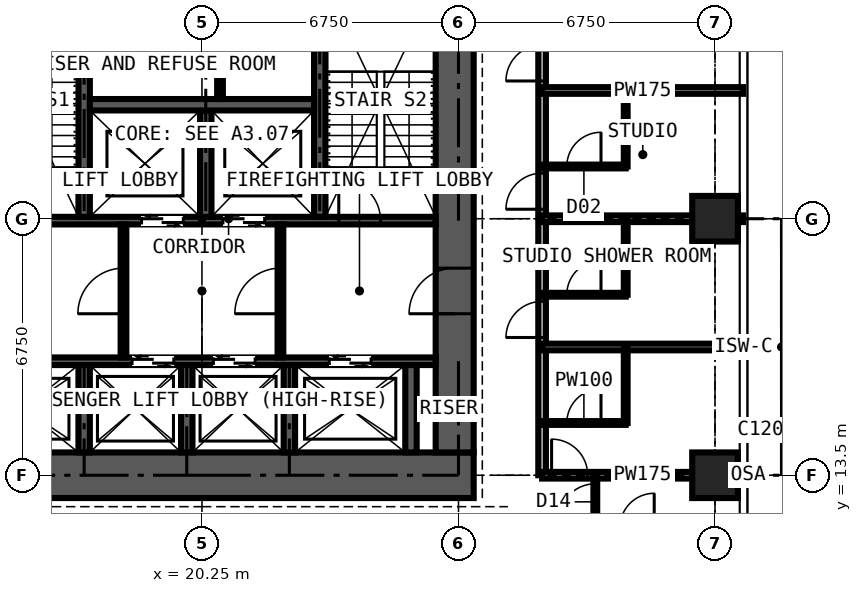
"""IFC4 building model, lengths in metres.
Left out: names, types, materials, properties, quantities, classifications, styles, units other than length and angle.
Written with IfcOpenShell. Run it as: python <this file> out.ifc"""

import sys

from ifc_helpers import new_model, si_unit, direction, frame, frame_2d, origin, origin_2d, place, context, subcontext, project, spatial, rectangle, extrude, element, fill, save


model = new_model("IFC4")
c1 = context("Model", 3, precision=1e-05, world=origin(), true_north=direction((0.0, 1.0)))
c2 = subcontext(c1, "Body", "Model", "MODEL_VIEW")
j1 = project(units=[si_unit("LENGTHUNIT", "METRE"), si_unit("PLANEANGLEUNIT", "RADIAN")], contexts=[c1])
p1 = place(None, origin())
s1 = spatial("IfcSite", under=j1, at=p1, CompositionType="ELEMENT")
p2 = place(p1, origin())
s2 = spatial("IfcBuilding", under=s1, at=p2, CompositionType="ELEMENT")
p3 = place(p2, frame((0.0, 0.0, 189.0)))
s3 = spatial("IfcBuildingStorey", under=s2, at=p3, CompositionType="ELEMENT", Elevation=189.0)
for number, where, z_axis, x_axis in (
    (1, (33.75, 13.5, 0.0), (0.0, 0.0, 1.0), (1.0, 0.0, 0.0)),
    (2, (33.75, 20.25, 0.0), (0.0, 0.0, 1.0), (1.0, 0.0, 0.0)),
):
    element("IfcColumn", number, at=place(p3, frame(where, z_axis=z_axis, x_axis=x_axis)), inside=s3, PredefinedType="COLUMN", context=c2, shape_type="SweptSolid", body=[
        extrude(rectangle(XDim=1.2, YDim=1.2, at=origin_2d()), origin(), (0.0, 0.0, 1.0), 3.6),
    ])
p4 = place(p3, frame((13.1, 13.5, 0.0), z_axis=(0.0, 0.0, 1.0), x_axis=(1.0, 0.0, 0.0)))
e3 = element("IfcWall", 3, at=p4, inside=s3, PredefinedType="SHEAR", context=c2, shape_type="SweptSolid", body=[
    extrude(rectangle(XDim=14.3, YDim=1.2, at=frame_2d((7.15, 0.0))), origin(), (0.0, 0.0, 1.0), 3.6),
])
p5 = place(p3, frame((26.9, 14.1, 0.0), z_axis=(0.0, 0.0, 1.0), x_axis=(0.0, 1.0, 0.0)))
e4 = element("IfcWall", 4, at=p5, inside=s3, PredefinedType="SHEAR", context=c2, shape_type="SweptSolid", body=[
    extrude(rectangle(XDim=12.3, YDim=1.0, at=frame_2d((6.15, 0.0))), origin(), (0.0, 0.0, 1.0), 3.6),
])
p6 = place(p5, frame((3.65, 0.0, 0.0)))
e5 = element("IfcOpeningElement", 5, at=p6, cuts=e4, PredefinedType="OPENING", context=c2, shape_type="SweptSolid", body=[
    extrude(rectangle(XDim=1.2, YDim=2.2, at=frame_2d((0.6, 1.1))), frame((0.0, 0.51, 0.0), z_axis=(0.0, -1.0, 0.0), x_axis=(1.0, 0.0, 0.0)), (0.0, 0.0, 1.0), 1.02),
])
p7 = place(p3, frame((14.1, 16.5, 0.0), z_axis=(0.0, 0.0, 1.0), x_axis=(1.0, 0.0, 0.0)))
e6 = element("IfcWall", 6, at=p7, inside=s3, PredefinedType="SHEAR", context=c2, shape_type="SweptSolid", body=[
    extrude(rectangle(XDim=12.3, YDim=0.2, at=frame_2d((6.15, 0.0))), origin(), (0.0, 0.0, 1.0), 3.6),
])
p8 = place(p7, frame((0.9, 0.0, 0.0)))
e7 = element("IfcOpeningElement", 7, at=p8, cuts=e6, PredefinedType="OPENING", context=c2, shape_type="SweptSolid", body=[
    extrude(rectangle(XDim=1.1, YDim=2.2, at=frame_2d((0.55, 1.1))), frame((0.0, 0.11, 0.0), z_axis=(0.0, -1.0, 0.0), x_axis=(1.0, 0.0, 0.0)), (0.0, 0.0, 1.0), 0.22),
])
p9 = place(p7, frame((4.31, 0.0, 0.0)))
e8 = element("IfcOpeningElement", 8, at=p9, cuts=e6, PredefinedType="OPENING", context=c2, shape_type="SweptSolid", body=[
    extrude(rectangle(XDim=1.1, YDim=2.2, at=frame_2d((0.55, 1.1))), frame((0.0, 0.11, 0.0), z_axis=(0.0, -1.0, 0.0), x_axis=(1.0, 0.0, 0.0)), (0.0, 0.0, 1.0), 0.22),
])
p10 = place(p7, frame((6.45, 0.0, 0.0)))
e9 = element("IfcOpeningElement", 9, at=p10, cuts=e6, PredefinedType="OPENING", context=c2, shape_type="SweptSolid", body=[
    extrude(rectangle(XDim=1.1, YDim=2.2, at=frame_2d((0.55, 1.1))), frame((0.0, 0.11, 0.0), z_axis=(0.0, -1.0, 0.0), x_axis=(1.0, 0.0, 0.0)), (0.0, 0.0, 1.0), 0.22),
])
p11 = place(p7, frame((9.5, 0.0, 0.0)))
e10 = element("IfcOpeningElement", 10, at=p11, cuts=e6, PredefinedType="OPENING", context=c2, shape_type="SweptSolid", body=[
    extrude(rectangle(XDim=1.1, YDim=2.2, at=frame_2d((0.55, 1.1))), frame((0.0, 0.11, 0.0), z_axis=(0.0, -1.0, 0.0), x_axis=(1.0, 0.0, 0.0)), (0.0, 0.0, 1.0), 0.22),
])
p12 = place(p3, frame((14.1, 20.2, 0.0), z_axis=(0.0, 0.0, 1.0), x_axis=(1.0, 0.0, 0.0)))
e11 = element("IfcWall", 11, at=p12, inside=s3, PredefinedType="SHEAR", context=c2, shape_type="SweptSolid", body=[
    extrude(rectangle(XDim=12.3, YDim=0.2, at=frame_2d((6.15, 0.0))), origin(), (0.0, 0.0, 1.0), 3.6),
])
p13 = place(p12, frame((4.56, 0.0, 0.0)))
e12 = element("IfcOpeningElement", 12, at=p13, cuts=e11, PredefinedType="OPENING", context=c2, shape_type="SweptSolid", body=[
    extrude(rectangle(XDim=1.1, YDim=2.2, at=frame_2d((0.55, 1.1))), frame((0.0, 0.11, 0.0), z_axis=(0.0, -1.0, 0.0), x_axis=(1.0, 0.0, 0.0)), (0.0, 0.0, 1.0), 0.22),
])
p14 = place(p12, frame((6.7, 0.0, 0.0)))
e13 = element("IfcOpeningElement", 13, at=p14, cuts=e11, PredefinedType="OPENING", context=c2, shape_type="SweptSolid", body=[
    extrude(rectangle(XDim=1.1, YDim=2.2, at=frame_2d((0.55, 1.1))), frame((0.0, 0.11, 0.0), z_axis=(0.0, -1.0, 0.0), x_axis=(1.0, 0.0, 0.0)), (0.0, 0.0, 1.0), 0.22),
])
p15 = place(p12, frame((0.35, 0.0, 0.0)))
e14 = element("IfcOpeningElement", 14, at=p15, cuts=e11, PredefinedType="OPENING", context=c2, shape_type="SweptSolid", body=[
    extrude(rectangle(XDim=1.1, YDim=2.2, at=frame_2d((0.55, 1.1))), frame((0.0, 0.11, 0.0), z_axis=(0.0, -1.0, 0.0), x_axis=(1.0, 0.0, 0.0)), (0.0, 0.0, 1.0), 0.22),
])
p16 = place(p12, frame((9.75, 0.0, 0.0)))
e15 = element("IfcOpeningElement", 15, at=p16, cuts=e11, PredefinedType="OPENING", context=c2, shape_type="SweptSolid", body=[
    extrude(rectangle(XDim=1.1, YDim=2.2, at=frame_2d((0.55, 1.1))), frame((0.0, 0.11, 0.0), z_axis=(0.0, -1.0, 0.0), x_axis=(1.0, 0.0, 0.0)), (0.0, 0.0, 1.0), 0.22),
])
for number, where, z_axis, x_axis in (
    (16, (17.15, 20.3, 0.0), (0.0, 0.0, 1.0), (0.0, 1.0, 0.0)),
    (17, (23.35, 20.3, 0.0), (0.0, 0.0, 1.0), (0.0, 1.0, 0.0)),
):
    element("IfcWall", number, at=place(p3, frame(where, z_axis=z_axis, x_axis=x_axis)), inside=s3, PredefinedType="SHEAR", context=c2, shape_type="SweptSolid", body=[
        extrude(rectangle(XDim=6.1, YDim=0.3, at=frame_2d((3.05, 0.0))), origin(), (0.0, 0.0, 1.0), 3.6),
    ])
p17 = place(p3, frame((20.35, 20.3, 0.0), z_axis=(0.0, 0.0, 1.0), x_axis=(0.0, 1.0, 0.0)))
e18 = element("IfcWall", 18, at=p17, inside=s3, PredefinedType="SHEAR", context=c2, shape_type="SweptSolid", body=[
    extrude(rectangle(XDim=2.8, YDim=0.3, at=frame_2d((1.4, 0.0))), origin(), (0.0, 0.0, 1.0), 3.6),
])
p18 = place(p3, frame((17.3, 23.25, 0.0), z_axis=(0.0, 0.0, 1.0), x_axis=(1.0, 0.0, 0.0)))
e19 = element("IfcWall", 19, at=p18, inside=s3, PredefinedType="SHEAR", context=c2, shape_type="SweptSolid", body=[
    extrude(rectangle(XDim=5.9, YDim=0.3, at=frame_2d((2.95, 0.0))), origin(), (0.0, 0.0, 1.0), 3.6),
])
for number, where, z_axis, x_axis in (
    (20, (17.15, 14.1, 0.0), (0.0, 0.0, 1.0), (0.0, 1.0, 0.0)),
    (21, (19.85, 14.1, 0.0), (0.0, 0.0, 1.0), (0.0, 1.0, 0.0)),
    (22, (22.55, 14.1, 0.0), (0.0, 0.0, 1.0), (0.0, 1.0, 0.0)),
    (23, (25.75, 14.1, 0.0), (0.0, 0.0, 1.0), (0.0, 1.0, 0.0)),
):
    element("IfcWall", number, at=place(p3, frame(where, z_axis=z_axis, x_axis=x_axis)), inside=s3, PredefinedType="SHEAR", context=c2, shape_type="SweptSolid", body=[
        extrude(rectangle(XDim=2.3, YDim=0.3, at=frame_2d((1.15, 0.0))), origin(), (0.0, 0.0, 1.0), 3.6),
    ])
p19 = place(p3, frame((18.185, 16.6, 0.0), z_axis=(0.0, 0.0, 1.0), x_axis=(0.0, 1.0, 0.0)))
e24 = element("IfcWall", 24, at=p19, inside=s3, PredefinedType="PARTITIONING", context=c2, shape_type="SweptSolid", body=[
    extrude(rectangle(XDim=3.5, YDim=0.15, at=frame_2d((1.75, 0.0))), origin(), (0.0, 0.0, 1.0), 3.375),
])
p20 = place(p19, frame((1.15, 0.0, 0.0)))
e25 = element("IfcOpeningElement", 25, at=p20, cuts=e24, PredefinedType="OPENING", context=c2, shape_type="SweptSolid", body=[
    extrude(rectangle(XDim=1.2, YDim=2.2, at=frame_2d((0.6, 1.1))), frame((0.0, 0.085, 0.0), z_axis=(0.0, -1.0, 0.0), x_axis=(1.0, 0.0, 0.0)), (0.0, 0.0, 1.0), 0.17),
])
p21 = place(p3, frame((22.315, 16.6, 0.0), z_axis=(0.0, 0.0, 1.0), x_axis=(0.0, 1.0, 0.0)))
e26 = element("IfcWall", 26, at=p21, inside=s3, PredefinedType="PARTITIONING", context=c2, shape_type="SweptSolid", body=[
    extrude(rectangle(XDim=3.5, YDim=0.15, at=frame_2d((1.75, 0.0))), origin(), (0.0, 0.0, 1.0), 3.375),
])
p22 = place(p21, frame((1.15, 0.0, 0.0)))
e27 = element("IfcOpeningElement", 27, at=p22, cuts=e26, PredefinedType="OPENING", context=c2, shape_type="SweptSolid", body=[
    extrude(rectangle(XDim=1.2, YDim=2.2, at=frame_2d((0.6, 1.1))), frame((0.0, 0.085, 0.0), z_axis=(0.0, -1.0, 0.0), x_axis=(1.0, 0.0, 0.0)), (0.0, 0.0, 1.0), 0.17),
])
p23 = place(p3, frame((20.725, 23.4, 0.0), z_axis=(0.0, 0.0, 1.0), x_axis=(0.0, 1.0, 0.0)))
e28 = element("IfcWall", 28, at=p23, inside=s3, PredefinedType="PARTITIONING", context=c2, shape_type="SweptSolid", body=[
    extrude(rectangle(XDim=3.0, YDim=0.15, at=frame_2d((1.5, 0.0))), origin(), (0.0, 0.0, 1.0), 3.375),
])
p24 = place(p3, frame((29.2, 13.5, 0.0), z_axis=(0.0, 0.0, 1.0), x_axis=(0.0, 1.0, 0.0)))
e29 = element("IfcWall", 29, at=p24, inside=s3, PredefinedType="PARTITIONING", context=c2, shape_type="SweptSolid", body=[
    extrude(rectangle(XDim=15.7, YDim=0.2, at=frame_2d((7.85, 0.0))), origin(), (0.0, 0.0, 1.0), 3.375),
])
p25 = place(p24, frame((3.625, 0.0, 0.0)))
e30 = element("IfcOpeningElement", 30, at=p25, cuts=e29, PredefinedType="OPENING", context=c2, shape_type="SweptSolid", body=[
    extrude(rectangle(XDim=0.95, YDim=2.2, at=frame_2d((0.475, 1.1))), frame((0.0, 0.11, 0.0), z_axis=(0.0, -1.0, 0.0), x_axis=(1.0, 0.0, 0.0)), (0.0, 0.0, 1.0), 0.22),
])
p26 = place(p24, frame((7.0, 0.0, 0.0)))
e31 = element("IfcOpeningElement", 31, at=p26, cuts=e29, PredefinedType="OPENING", context=c2, shape_type="SweptSolid", body=[
    extrude(rectangle(XDim=0.95, YDim=2.2, at=frame_2d((0.475, 1.1))), frame((0.0, 0.11, 0.0), z_axis=(0.0, -1.0, 0.0), x_axis=(1.0, 0.0, 0.0)), (0.0, 0.0, 1.0), 0.22),
])
p27 = place(p24, frame((10.375, 0.0, 0.0)))
e32 = element("IfcOpeningElement", 32, at=p27, cuts=e29, PredefinedType="OPENING", context=c2, shape_type="SweptSolid", body=[
    extrude(rectangle(XDim=0.95, YDim=2.2, at=frame_2d((0.475, 1.1))), frame((0.0, 0.11, 0.0), z_axis=(0.0, -1.0, 0.0), x_axis=(1.0, 0.0, 0.0)), (0.0, 0.0, 1.0), 0.22),
])
p28 = place(p24, frame((14.1, 0.0, 0.0)))
e33 = element("IfcOpeningElement", 33, at=p28, cuts=e29, PredefinedType="OPENING", context=c2, shape_type="SweptSolid", body=[
    extrude(rectangle(XDim=1.0, YDim=2.2, at=frame_2d((0.5, 1.1))), frame((0.0, 0.11, 0.0), z_axis=(0.0, -1.0, 0.0), x_axis=(1.0, 0.0, 0.0)), (0.0, 0.0, 1.0), 0.22),
])
p29 = place(p3, frame((29.2, 13.5, 0.0), z_axis=(0.0, 0.0, 1.0), x_axis=(1.0, 0.0, 0.0)))
e34 = element("IfcWall", 34, at=p29, inside=s3, PredefinedType="PARTITIONING", context=c2, shape_type="SweptSolid", body=[
    extrude(rectangle(XDim=5.284, YDim=0.175, at=frame_2d((2.642, 0.0))), origin(), (0.0, 0.0, 1.0), 2.61),
])
p30 = place(p29, frame((0.25, 0.0, 0.0)))
e35 = element("IfcOpeningElement", 35, at=p30, cuts=e34, PredefinedType="OPENING", context=c2, shape_type="SweptSolid", body=[
    extrude(rectangle(XDim=0.95, YDim=2.2, at=frame_2d((0.475, 1.1))), frame((0.0, 0.097, 0.0), z_axis=(0.0, -1.0, 0.0), x_axis=(1.0, 0.0, 0.0)), (0.0, 0.0, 1.0), 0.195),
])
p31 = place(p3, frame((29.2, 14.875, 0.0), z_axis=(0.0, 0.0, 1.0), x_axis=(1.0, 0.0, 0.0)))
e36 = element("IfcWall", 36, at=p31, inside=s3, PredefinedType="PARTITIONING", context=c2, shape_type="SweptSolid", body=[
    extrude(rectangle(XDim=2.2, YDim=0.1, at=frame_2d((1.1, 0.0))), origin(), (0.0, 0.0, 1.0), 3.375),
])
p32 = place(p31, frame((0.65, 0.0, 0.0)))
e37 = element("IfcOpeningElement", 37, at=p32, cuts=e36, PredefinedType="OPENING", context=c2, shape_type="SweptSolid", body=[
    extrude(rectangle(XDim=0.9, YDim=2.2, at=frame_2d((0.45, 1.1))), frame((0.0, 0.06, 0.0), z_axis=(0.0, -1.0, 0.0), x_axis=(1.0, 0.0, 0.0)), (0.0, 0.0, 1.0), 0.12),
])
p33 = place(p3, frame((29.2, 16.875, 0.0), z_axis=(0.0, 0.0, 1.0), x_axis=(1.0, 0.0, 0.0)))
e38 = element("IfcWall", 38, at=p33, inside=s3, PredefinedType="PARTITIONING", context=c2, shape_type="SweptSolid", body=[
    extrude(rectangle(XDim=5.284, YDim=0.175, at=frame_2d((2.642, 0.0))), origin(), (0.0, 0.0, 1.0), 3.375),
])
p34 = place(p3, frame((29.2, 18.25, 0.0), z_axis=(0.0, 0.0, 1.0), x_axis=(1.0, 0.0, 0.0)))
e39 = element("IfcWall", 39, at=p34, inside=s3, PredefinedType="PARTITIONING", context=c2, shape_type="SweptSolid", body=[
    extrude(rectangle(XDim=2.2, YDim=0.1, at=frame_2d((1.1, 0.0))), origin(), (0.0, 0.0, 1.0), 3.375),
])
p35 = place(p34, frame((0.65, 0.0, 0.0)))
e40 = element("IfcOpeningElement", 40, at=p35, cuts=e39, PredefinedType="OPENING", context=c2, shape_type="SweptSolid", body=[
    extrude(rectangle(XDim=0.9, YDim=2.2, at=frame_2d((0.45, 1.1))), frame((0.0, 0.06, 0.0), z_axis=(0.0, -1.0, 0.0), x_axis=(1.0, 0.0, 0.0)), (0.0, 0.0, 1.0), 0.12),
])
p36 = place(p3, frame((29.2, 20.25, 0.0), z_axis=(0.0, 0.0, 1.0), x_axis=(1.0, 0.0, 0.0)))
e41 = element("IfcWall", 41, at=p36, inside=s3, PredefinedType="PARTITIONING", context=c2, shape_type="SweptSolid", body=[
    extrude(rectangle(XDim=5.284, YDim=0.175, at=frame_2d((2.642, 0.0))), origin(), (0.0, 0.0, 1.0), 2.61),
])
p37 = place(p3, frame((29.2, 21.625, 0.0), z_axis=(0.0, 0.0, 1.0), x_axis=(1.0, 0.0, 0.0)))
e42 = element("IfcWall", 42, at=p37, inside=s3, PredefinedType="PARTITIONING", context=c2, shape_type="SweptSolid", body=[
    extrude(rectangle(XDim=2.2, YDim=0.1, at=frame_2d((1.1, 0.0))), origin(), (0.0, 0.0, 1.0), 3.375),
])
p38 = place(p37, frame((0.65, 0.0, 0.0)))
e43 = element("IfcOpeningElement", 43, at=p38, cuts=e42, PredefinedType="OPENING", context=c2, shape_type="SweptSolid", body=[
    extrude(rectangle(XDim=0.9, YDim=2.2, at=frame_2d((0.45, 1.1))), frame((0.0, 0.06, 0.0), z_axis=(0.0, -1.0, 0.0), x_axis=(1.0, 0.0, 0.0)), (0.0, 0.0, 1.0), 0.12),
])
p39 = place(p3, frame((29.2, 23.625, 0.0), z_axis=(0.0, 0.0, 1.0), x_axis=(1.0, 0.0, 0.0)))
e44 = element("IfcWall", 44, at=p39, inside=s3, PredefinedType="PARTITIONING", context=c2, shape_type="SweptSolid", body=[
    extrude(rectangle(XDim=5.284, YDim=0.175, at=frame_2d((2.642, 0.0))), origin(), (0.0, 0.0, 1.0), 3.375),
])
p40 = place(p3, frame((30.6, 10.125, 0.0), z_axis=(0.0, 0.0, 1.0), x_axis=(0.0, 1.0, 0.0)))
e45 = element("IfcWall", 45, at=p40, inside=s3, PredefinedType="PARTITIONING", context=c2, shape_type="SweptSolid", body=[
    extrude(rectangle(XDim=3.375, YDim=0.1, at=frame_2d((1.688, 0.0))), origin(), (0.0, 0.0, 1.0), 3.375),
])
p41 = place(p40, frame((2.2, 0.0, 0.0)))
e46 = element("IfcOpeningElement", 46, at=p41, cuts=e45, PredefinedType="OPENING", context=c2, shape_type="SweptSolid", body=[
    extrude(rectangle(XDim=0.95, YDim=2.2, at=frame_2d((0.475, 1.1))), frame((0.0, 0.06, 0.0), z_axis=(0.0, -1.0, 0.0), x_axis=(1.0, 0.0, 0.0)), (0.0, 0.0, 1.0), 0.12),
])
for number, where, z_axis, x_axis in (
    (47, (31.4, 14.875, 0.0), (0.0, 0.0, 1.0), (0.0, 1.0, 0.0)),
    (48, (31.4, 18.25, 0.0), (0.0, 0.0, 1.0), (0.0, 1.0, 0.0)),
    (49, (31.4, 21.625, 0.0), (0.0, 0.0, 1.0), (0.0, 1.0, 0.0)),
):
    element("IfcWall", number, at=place(p3, frame(where, z_axis=z_axis, x_axis=x_axis)), inside=s3, PredefinedType="PARTITIONING", context=c2, shape_type="SweptSolid", body=[
        extrude(rectangle(XDim=2.0, YDim=0.1, at=frame_2d((1.0, 0.0))), origin(), (0.0, 0.0, 1.0), 3.375),
    ])
p42 = place(p9, origin())
e50 = element("IfcDoor", 50, at=p42, inside=s3, OperationType="DOUBLE_DOOR_SLIDING", PredefinedType="DOOR", context=c2, shape_type="SweptSolid", body=[
    extrude(rectangle(XDim=1.1, YDim=2.2, at=frame_2d((0.55, 1.1))), frame((0.0, 0.025, 0.0), z_axis=(0.0, -1.0, 0.0), x_axis=(1.0, 0.0, 0.0)), (0.0, 0.0, 1.0), 0.05),
])
fill(e8, e50)
p43 = place(p10, origin())
e51 = element("IfcDoor", 51, at=p43, inside=s3, OperationType="DOUBLE_DOOR_SLIDING", PredefinedType="DOOR", context=c2, shape_type="SweptSolid", body=[
    extrude(rectangle(XDim=1.1, YDim=2.2, at=frame_2d((0.55, 1.1))), frame((0.0, 0.025, 0.0), z_axis=(0.0, -1.0, 0.0), x_axis=(1.0, 0.0, 0.0)), (0.0, 0.0, 1.0), 0.05),
])
fill(e9, e51)
p44 = place(p11, origin())
e52 = element("IfcDoor", 52, at=p44, inside=s3, OperationType="DOUBLE_DOOR_SLIDING", PredefinedType="DOOR", context=c2, shape_type="SweptSolid", body=[
    extrude(rectangle(XDim=1.1, YDim=2.2, at=frame_2d((0.55, 1.1))), frame((0.0, 0.025, 0.0), z_axis=(0.0, -1.0, 0.0), x_axis=(1.0, 0.0, 0.0)), (0.0, 0.0, 1.0), 0.05),
])
fill(e10, e52)
p45 = place(p13, origin())
e53 = element("IfcDoor", 53, at=p45, inside=s3, OperationType="DOUBLE_DOOR_SLIDING", PredefinedType="DOOR", context=c2, shape_type="SweptSolid", body=[
    extrude(rectangle(XDim=1.1, YDim=2.2, at=frame_2d((0.55, 1.1))), frame((0.0, 0.025, 0.0), z_axis=(0.0, -1.0, 0.0), x_axis=(1.0, 0.0, 0.0)), (0.0, 0.0, 1.0), 0.05),
])
fill(e12, e53)
p46 = place(p14, origin())
e54 = element("IfcDoor", 54, at=p46, inside=s3, OperationType="DOUBLE_DOOR_SLIDING", PredefinedType="DOOR", context=c2, shape_type="SweptSolid", body=[
    extrude(rectangle(XDim=1.1, YDim=2.2, at=frame_2d((0.55, 1.1))), frame((0.0, 0.025, 0.0), z_axis=(0.0, -1.0, 0.0), x_axis=(1.0, 0.0, 0.0)), (0.0, 0.0, 1.0), 0.05),
])
fill(e13, e54)
p47 = place(p6, origin())
e55 = element("IfcDoor", 55, at=p47, inside=s3, OperationType="DOUBLE_DOOR_SINGLE_SWING", PredefinedType="DOOR", context=c2, shape_type="SweptSolid", body=[
    extrude(rectangle(XDim=1.2, YDim=2.2, at=frame_2d((0.6, 1.1))), frame((0.0, 0.025, 0.0), z_axis=(0.0, -1.0, 0.0), x_axis=(1.0, 0.0, 0.0)), (0.0, 0.0, 1.0), 0.05),
])
fill(e5, e55)
p48 = place(p20, origin())
e56 = element("IfcDoor", 56, at=p48, inside=s3, OperationType="DOUBLE_DOOR_SINGLE_SWING", PredefinedType="DOOR", context=c2, shape_type="SweptSolid", body=[
    extrude(rectangle(XDim=1.2, YDim=2.2, at=frame_2d((0.6, 1.1))), frame((0.0, 0.025, 0.0), z_axis=(0.0, -1.0, 0.0), x_axis=(1.0, 0.0, 0.0)), (0.0, 0.0, 1.0), 0.05),
])
fill(e25, e56)
p49 = place(p22, origin())
e57 = element("IfcDoor", 57, at=p49, inside=s3, OperationType="DOUBLE_DOOR_SINGLE_SWING", PredefinedType="DOOR", context=c2, shape_type="SweptSolid", body=[
    extrude(rectangle(XDim=1.2, YDim=2.2, at=frame_2d((0.6, 1.1))), frame((0.0, 0.025, 0.0), z_axis=(0.0, -1.0, 0.0), x_axis=(1.0, 0.0, 0.0)), (0.0, 0.0, 1.0), 0.05),
])
fill(e27, e57)
p50 = place(p16, origin())
e58 = element("IfcDoor", 58, at=p50, inside=s3, OperationType="SINGLE_SWING_LEFT", PredefinedType="DOOR", context=c2, shape_type="SweptSolid", body=[
    extrude(rectangle(XDim=1.1, YDim=2.2, at=frame_2d((0.55, 1.1))), frame((0.0, 0.025, 0.0), z_axis=(0.0, -1.0, 0.0), x_axis=(1.0, 0.0, 0.0)), (0.0, 0.0, 1.0), 0.05),
])
fill(e15, e58)
p51 = place(p41, origin())
e59 = element("IfcDoor", 59, at=p51, inside=s3, OperationType="SINGLE_SWING_LEFT", PredefinedType="DOOR", context=c2, shape_type="SweptSolid", body=[
    extrude(rectangle(XDim=0.95, YDim=2.2, at=frame_2d((0.475, 1.1))), frame((0.0, 0.025, 0.0), z_axis=(0.0, -1.0, 0.0), x_axis=(1.0, 0.0, 0.0)), (0.0, 0.0, 1.0), 0.05),
])
fill(e46, e59)
p52 = place(p30, origin())
e60 = element("IfcDoor", 60, at=p52, inside=s3, OperationType="SINGLE_SWING_LEFT", PredefinedType="DOOR", context=c2, shape_type="SweptSolid", body=[
    extrude(rectangle(XDim=0.95, YDim=2.2, at=frame_2d((0.475, 1.1))), frame((0.0, 0.025, 0.0), z_axis=(0.0, -1.0, 0.0), x_axis=(1.0, 0.0, 0.0)), (0.0, 0.0, 1.0), 0.05),
])
fill(e35, e60)
p53 = place(p32, origin())
e61 = element("IfcDoor", 61, at=p53, inside=s3, OperationType="SINGLE_SWING_RIGHT", PredefinedType="DOOR", context=c2, shape_type="SweptSolid", body=[
    extrude(rectangle(XDim=0.9, YDim=2.2, at=frame_2d((0.45, 1.1))), frame((0.0, 0.025, 0.0), z_axis=(0.0, -1.0, 0.0), x_axis=(1.0, 0.0, 0.0)), (0.0, 0.0, 1.0), 0.05),
])
fill(e37, e61)
p54 = place(p25, origin())
e62 = element("IfcDoor", 62, at=p54, inside=s3, OperationType="SINGLE_SWING_LEFT", PredefinedType="DOOR", context=c2, shape_type="SweptSolid", body=[
    extrude(rectangle(XDim=0.95, YDim=2.2, at=frame_2d((0.475, 1.1))), frame((0.0, 0.025, 0.0), z_axis=(0.0, -1.0, 0.0), x_axis=(1.0, 0.0, 0.0)), (0.0, 0.0, 1.0), 0.05),
])
fill(e30, e62)
p55 = place(p35, origin())
e63 = element("IfcDoor", 63, at=p55, inside=s3, OperationType="SINGLE_SWING_RIGHT", PredefinedType="DOOR", context=c2, shape_type="SweptSolid", body=[
    extrude(rectangle(XDim=0.9, YDim=2.2, at=frame_2d((0.45, 1.1))), frame((0.0, 0.025, 0.0), z_axis=(0.0, -1.0, 0.0), x_axis=(1.0, 0.0, 0.0)), (0.0, 0.0, 1.0), 0.05),
])
fill(e40, e63)
p56 = place(p26, origin())
e64 = element("IfcDoor", 64, at=p56, inside=s3, OperationType="SINGLE_SWING_LEFT", PredefinedType="DOOR", context=c2, shape_type="SweptSolid", body=[
    extrude(rectangle(XDim=0.95, YDim=2.2, at=frame_2d((0.475, 1.1))), frame((0.0, 0.025, 0.0), z_axis=(0.0, -1.0, 0.0), x_axis=(1.0, 0.0, 0.0)), (0.0, 0.0, 1.0), 0.05),
])
fill(e31, e64)
p57 = place(p38, origin())
e65 = element("IfcDoor", 65, at=p57, inside=s3, OperationType="SINGLE_SWING_RIGHT", PredefinedType="DOOR", context=c2, shape_type="SweptSolid", body=[
    extrude(rectangle(XDim=0.9, YDim=2.2, at=frame_2d((0.45, 1.1))), frame((0.0, 0.025, 0.0), z_axis=(0.0, -1.0, 0.0), x_axis=(1.0, 0.0, 0.0)), (0.0, 0.0, 1.0), 0.05),
])
fill(e43, e65)
p58 = place(p27, origin())
e66 = element("IfcDoor", 66, at=p58, inside=s3, OperationType="SINGLE_SWING_LEFT", PredefinedType="DOOR", context=c2, shape_type="SweptSolid", body=[
    extrude(rectangle(XDim=0.95, YDim=2.2, at=frame_2d((0.475, 1.1))), frame((0.0, 0.025, 0.0), z_axis=(0.0, -1.0, 0.0), x_axis=(1.0, 0.0, 0.0)), (0.0, 0.0, 1.0), 0.05),
])
fill(e32, e66)
save(model, sys.argv[1])
